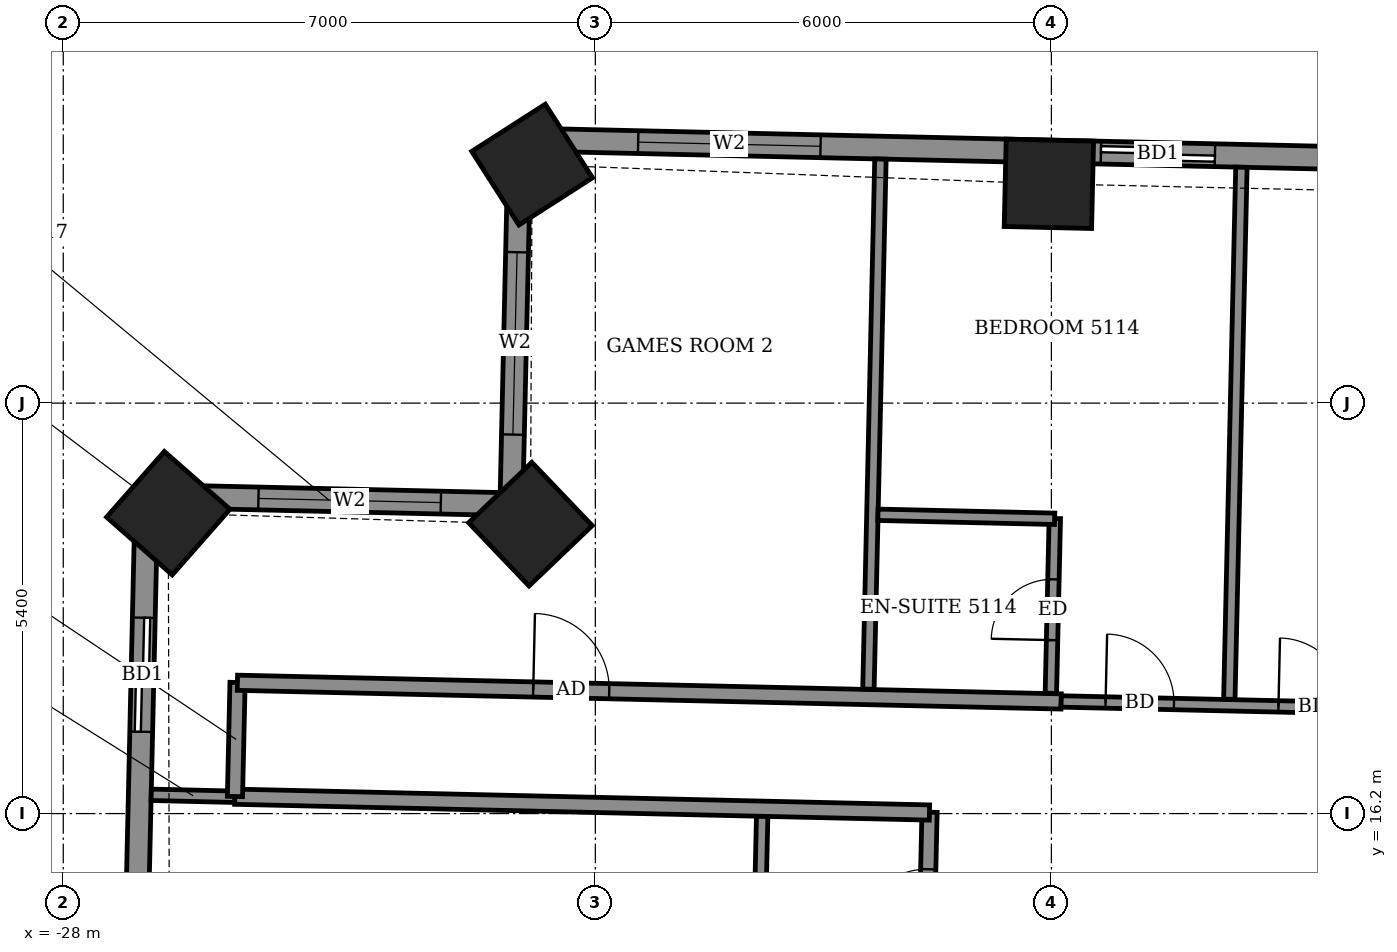
"""IFC4 building model, lengths in metres.
Left out: names, types, materials, properties, quantities, classifications, styles, units other than length and angle.
Written with IfcOpenShell. Run it as: python <this file> out.ifc"""

import sys

from ifc_helpers import new_model, si_unit, direction, frame, frame_2d, origin, origin_2d, place, context, subcontext, project, spatial, rectangle, extrude, element, fill, save


model = new_model("IFC4")
c1 = context("Model", 3, precision=1e-05, world=origin(), true_north=direction((0.0, 1.0)))
c2 = subcontext(c1, "Body", "Model", "MODEL_VIEW")
j1 = project(units=[si_unit("LENGTHUNIT", "METRE"), si_unit("PLANEANGLEUNIT", "RADIAN")], contexts=[c1])
p1 = place(None, origin())
s1 = spatial("IfcSite", under=j1, at=p1, CompositionType="ELEMENT")
p2 = place(p1, origin())
s2 = spatial("IfcBuilding", under=s1, at=p2, CompositionType="ELEMENT")
p3 = place(p2, frame((0.0, 0.0, 201.5)))
s3 = spatial("IfcBuildingStorey", under=s2, at=p3, CompositionType="ELEMENT", Elevation=201.5)
for number, where, z_axis, x_axis in (
    (1, (-15.033, 24.485, -0.55), (0.0, 0.0, 1.0), (-1.0, 0.023, 0.0)),
    (2, (-21.832, 24.738, -0.55), (0.0, 0.0, 1.0), (-0.842, -0.54, 0.0)),
    (3, (-21.854, 20.007, -0.55), (0.0, 0.0, 1.0), (-0.723, -0.691, 0.0)),
    (4, (-26.618, 20.152, -0.55), (0.0, 0.0, 1.0), (-0.661, -0.751, 0.0)),
):
    element("IfcColumn", number, at=place(p3, frame(where, z_axis=z_axis, x_axis=x_axis)), inside=s3, PredefinedType="COLUMN", context=c2, shape_type="SweptSolid", body=[
        extrude(rectangle(XDim=1.15, YDim=1.15, at=origin_2d()), origin(), (0.0, 0.0, 1.0), 3.6),
    ])
p4 = place(p3, frame((20.437, 24.106, 0.0), z_axis=(0.0, 0.0, 1.0), x_axis=(-0.999742506232, 0.022691875925, 0.0)))
e5 = element("IfcWall", 5, at=p4, inside=s3, PredefinedType="SOLIDWALL", context=c2, shape_type="SweptSolid", body=[
    extrude(rectangle(XDim=42.444, YDim=0.3, at=frame_2d((21.222, 0.0))), origin(), (0.0, 0.0, 1.0), 3.05),
])
p5 = place(p4, frame((2.287, 0.0, 0.0)))
e6 = element("IfcOpeningElement", 6, at=p5, cuts=e5, PredefinedType="OPENING", context=c2, shape_type="SweptSolid", body=[
    extrude(rectangle(XDim=1.5, YDim=2.4, at=frame_2d((0.75, 1.2))), frame((0.0, 0.16, 0.0), z_axis=(0.0, -1.0, 0.0), x_axis=(1.0, 0.0, 0.0)), (0.0, 0.0, 1.0), 0.32),
])
p6 = place(p4, frame((7.947, 0.0, 0.0)))
e7 = element("IfcOpeningElement", 7, at=p6, cuts=e5, PredefinedType="OPENING", context=c2, shape_type="SweptSolid", body=[
    extrude(rectangle(XDim=1.5, YDim=2.4, at=frame_2d((0.75, 1.2))), frame((0.0, 0.16, 0.0), z_axis=(0.0, -1.0, 0.0), x_axis=(1.0, 0.0, 0.0)), (0.0, 0.0, 1.0), 0.32),
])
p7 = place(p4, frame((11.184, 0.0, 0.0)))
e8 = element("IfcOpeningElement", 8, at=p7, cuts=e5, PredefinedType="OPENING", context=c2, shape_type="SweptSolid", body=[
    extrude(rectangle(XDim=1.5, YDim=2.4, at=frame_2d((0.75, 1.2))), frame((0.0, 0.16, 0.0), z_axis=(0.0, -1.0, 0.0), x_axis=(1.0, 0.0, 0.0)), (0.0, 0.0, 1.0), 0.32),
])
p8 = place(p4, frame((16.469, 0.0, 0.0)))
e9 = element("IfcOpeningElement", 9, at=p8, cuts=e5, PredefinedType="OPENING", context=c2, shape_type="SweptSolid", body=[
    extrude(rectangle(XDim=1.5, YDim=2.4, at=frame_2d((0.75, 1.2))), frame((0.0, 0.16, 0.0), z_axis=(0.0, -1.0, 0.0), x_axis=(1.0, 0.0, 0.0)), (0.0, 0.0, 1.0), 0.32),
])
p9 = place(p4, frame((22.02, 0.0, 0.0)))
e10 = element("IfcOpeningElement", 10, at=p9, cuts=e5, PredefinedType="OPENING", context=c2, shape_type="SweptSolid", body=[
    extrude(rectangle(XDim=1.5, YDim=2.4, at=frame_2d((0.75, 1.2))), frame((0.0, 0.16, 0.0), z_axis=(0.0, -1.0, 0.0), x_axis=(1.0, 0.0, 0.0)), (0.0, 0.0, 1.0), 0.32),
])
p10 = place(p4, frame((25.257, 0.0, 0.0)))
e11 = element("IfcOpeningElement", 11, at=p10, cuts=e5, PredefinedType="OPENING", context=c2, shape_type="SweptSolid", body=[
    extrude(rectangle(XDim=1.5, YDim=2.4, at=frame_2d((0.75, 1.2))), frame((0.0, 0.16, 0.0), z_axis=(0.0, -1.0, 0.0), x_axis=(1.0, 0.0, 0.0)), (0.0, 0.0, 1.0), 0.32),
])
p11 = place(p4, frame((30.057, 0.0, 0.0)))
e12 = element("IfcOpeningElement", 12, at=p11, cuts=e5, PredefinedType="OPENING", context=c2, shape_type="SweptSolid", body=[
    extrude(rectangle(XDim=1.5, YDim=2.4, at=frame_2d((0.75, 1.2))), frame((0.0, 0.16, 0.0), z_axis=(0.0, -1.0, 0.0), x_axis=(1.0, 0.0, 0.0)), (0.0, 0.0, 1.0), 0.32),
])
p12 = place(p4, frame((33.294, 0.0, 0.0)))
e13 = element("IfcOpeningElement", 13, at=p12, cuts=e5, PredefinedType="OPENING", context=c2, shape_type="SweptSolid", body=[
    extrude(rectangle(XDim=1.5, YDim=2.4, at=frame_2d((0.75, 1.2))), frame((0.0, 0.16, 0.0), z_axis=(0.0, -1.0, 0.0), x_axis=(1.0, 0.0, 0.0)), (0.0, 0.0, 1.0), 0.32),
])
p13 = place(p4, frame((38.484, 0.0, 0.9)))
e14 = element("IfcOpeningElement", 14, at=p13, cuts=e5, PredefinedType="OPENING", context=c2, shape_type="SweptSolid", body=[
    extrude(rectangle(XDim=2.4, YDim=1.5, at=frame_2d((1.2, 0.75))), frame((0.0, 0.16, 0.0), z_axis=(0.0, -1.0, 0.0), x_axis=(1.0, 0.0, 0.0)), (0.0, 0.0, 1.0), 0.32),
])
p14 = place(p3, frame((-21.996, 25.069, 0.0), z_axis=(0.0, 0.0, 1.0), x_axis=(-0.022683280499, -0.999742701292, 0.0)))
e15 = element("IfcWall", 15, at=p14, inside=s3, PredefinedType="SOLIDWALL", context=c2, shape_type="SweptSolid", body=[
    extrude(rectangle(XDim=4.8, YDim=0.3, at=frame_2d((2.4, 0.0))), origin(), (0.0, 0.0, 1.0), 2.55),
])
p15 = place(p14, frame((1.484, 0.0, 0.9)))
e16 = element("IfcOpeningElement", 16, at=p15, cuts=e15, PredefinedType="OPENING", context=c2, shape_type="SweptSolid", body=[
    extrude(rectangle(XDim=2.4, YDim=1.5, at=frame_2d((1.2, 0.75))), frame((0.0, 0.16, 0.0), z_axis=(0.0, -1.0, 0.0), x_axis=(1.0, 0.0, 0.0)), (0.0, 0.0, 1.0), 0.32),
])
p16 = place(p3, frame((-22.105, 20.27, 0.0), z_axis=(0.0, 0.0, 1.0), x_axis=(-0.999742701292, 0.022683280499, 0.0)))
e17 = element("IfcWall", 17, at=p16, inside=s3, PredefinedType="SOLIDWALL", context=c2, shape_type="SweptSolid", body=[
    extrude(rectangle(XDim=4.8, YDim=0.3, at=frame_2d((2.4, 0.0))), origin(), (0.0, 0.0, 1.0), 2.55),
])
p17 = place(p16, frame((0.928, 0.0, 0.9)))
e18 = element("IfcOpeningElement", 18, at=p17, cuts=e17, PredefinedType="OPENING", context=c2, shape_type="SweptSolid", body=[
    extrude(rectangle(XDim=2.4, YDim=1.5, at=frame_2d((1.2, 0.75))), frame((0.0, 0.16, 0.0), z_axis=(0.0, -1.0, 0.0), x_axis=(1.0, 0.0, 0.0)), (0.0, 0.0, 1.0), 0.32),
])
p18 = place(p3, frame((-26.904, 20.379, 0.0), z_axis=(0.0, 0.0, 1.0), x_axis=(-0.022669030322, -0.999743024514, 0.0)))
e19 = element("IfcWall", 19, at=p18, inside=s3, PredefinedType="SOLIDWALL", context=c2, shape_type="SweptSolid", body=[
    extrude(rectangle(XDim=11.33, YDim=0.3, at=frame_2d((5.665, 0.0))), origin(), (0.0, 0.0, 1.0), 2.55),
])
p19 = place(p18, frame((1.603, 0.0, 0.0)))
e20 = element("IfcOpeningElement", 20, at=p19, cuts=e19, PredefinedType="OPENING", context=c2, shape_type="SweptSolid", body=[
    extrude(rectangle(XDim=1.5, YDim=2.4, at=frame_2d((0.75, 1.2))), frame((0.0, 0.16, 0.0), z_axis=(0.0, -1.0, 0.0), x_axis=(1.0, 0.0, 0.0)), (0.0, 0.0, 1.0), 0.32),
])
p20 = place(p18, frame((7.218, 0.0, 0.9)))
e21 = element("IfcOpeningElement", 21, at=p20, cuts=e19, PredefinedType="OPENING", context=c2, shape_type="SweptSolid", body=[
    extrude(rectangle(XDim=2.4, YDim=1.5, at=frame_2d((1.2, 0.75))), frame((0.0, 0.16, 0.0), z_axis=(0.0, -1.0, 0.0), x_axis=(1.0, 0.0, 0.0)), (0.0, 0.0, 1.0), 0.32),
])
p21 = place(p3, frame((-17.247, -12.149, 0.0), z_axis=(0.0, 0.0, 1.0), x_axis=(0.022698146637, 0.999742363881, 0.0)))
e22 = element("IfcWall", 22, at=p21, inside=s3, PredefinedType="PARTITIONING", context=c2, shape_type="SweptSolid", body=[
    extrude(rectangle(XDim=28.374, YDim=0.2, at=frame_2d((14.187, 0.0))), origin(), (0.0, 0.0, 1.0), 3.05),
])
p22 = place(p21, frame((23.0, 0.0, 0.0)))
e23 = element("IfcOpeningElement", 23, at=p22, cuts=e22, PredefinedType="OPENING", context=c2, shape_type="SweptSolid", body=[
    extrude(rectangle(XDim=1.0, YDim=2.1, at=frame_2d((0.5, 1.05))), frame((0.0, 0.11, 0.0), z_axis=(0.0, -1.0, 0.0), x_axis=(1.0, 0.0, 0.0)), (0.0, 0.0, 1.0), 0.22),
])
p23 = place(p21, frame((26.724, 0.0, 0.0)))
e24 = element("IfcOpeningElement", 24, at=p23, cuts=e22, PredefinedType="OPENING", context=c2, shape_type="SweptSolid", body=[
    extrude(rectangle(XDim=0.9, YDim=2.1, at=frame_2d((0.45, 1.05))), frame((0.0, 0.11, 0.0), z_axis=(0.0, -1.0, 0.0), x_axis=(1.0, 0.0, 0.0)), (0.0, 0.0, 1.0), 0.22),
])
p24 = place(p21, frame((17.025, 0.0, 0.0)))
e25 = element("IfcOpeningElement", 25, at=p24, cuts=e22, PredefinedType="OPENING", context=c2, shape_type="SweptSolid", body=[
    extrude(rectangle(XDim=1.0, YDim=2.1, at=frame_2d((0.5, 1.05))), frame((0.0, 0.11, 0.0), z_axis=(0.0, -1.0, 0.0), x_axis=(1.0, 0.0, 0.0)), (0.0, 0.0, 1.0), 0.22),
])
p25 = place(p21, frame((19.275, 0.0, 0.0)))
e26 = element("IfcOpeningElement", 26, at=p25, cuts=e22, PredefinedType="OPENING", context=c2, shape_type="SweptSolid", body=[
    extrude(rectangle(XDim=0.9, YDim=2.1, at=frame_2d((0.45, 1.05))), frame((0.0, 0.11, 0.0), z_axis=(0.0, -1.0, 0.0), x_axis=(1.0, 0.0, 0.0)), (0.0, 0.0, 1.0), 0.22),
])
p26 = place(p21, frame((14.95, 0.0, 0.0)))
e27 = element("IfcOpeningElement", 27, at=p26, cuts=e22, PredefinedType="OPENING", context=c2, shape_type="SweptSolid", body=[
    extrude(rectangle(XDim=1.0, YDim=2.1, at=frame_2d((0.5, 1.05))), frame((0.0, 0.11, 0.0), z_axis=(0.0, -1.0, 0.0), x_axis=(1.0, 0.0, 0.0)), (0.0, 0.0, 1.0), 0.22),
])
p27 = place(p21, frame((12.625, 0.0, 0.0)))
e28 = element("IfcOpeningElement", 28, at=p27, cuts=e22, PredefinedType="OPENING", context=c2, shape_type="SweptSolid", body=[
    extrude(rectangle(XDim=0.9, YDim=2.1, at=frame_2d((0.45, 1.05))), frame((0.0, 0.11, 0.0), z_axis=(0.0, -1.0, 0.0), x_axis=(1.0, 0.0, 0.0)), (0.0, 0.0, 1.0), 0.22),
])
p28 = place(p21, frame((10.275, 0.0, 0.0)))
e29 = element("IfcOpeningElement", 29, at=p28, cuts=e22, PredefinedType="OPENING", context=c2, shape_type="SweptSolid", body=[
    extrude(rectangle(XDim=1.0, YDim=2.1, at=frame_2d((0.5, 1.05))), frame((0.0, 0.11, 0.0), z_axis=(0.0, -1.0, 0.0), x_axis=(1.0, 0.0, 0.0)), (0.0, 0.0, 1.0), 0.22),
])
p29 = place(p21, frame((8.025, 0.0, 0.0)))
e30 = element("IfcOpeningElement", 30, at=p29, cuts=e22, PredefinedType="OPENING", context=c2, shape_type="SweptSolid", body=[
    extrude(rectangle(XDim=0.9, YDim=2.1, at=frame_2d((0.45, 1.05))), frame((0.0, 0.11, 0.0), z_axis=(0.0, -1.0, 0.0), x_axis=(1.0, 0.0, 0.0)), (0.0, 0.0, 1.0), 0.22),
])
p30 = place(p21, frame((4.337, 0.0, 0.0)))
e31 = element("IfcOpeningElement", 31, at=p30, cuts=e22, PredefinedType="OPENING", context=c2, shape_type="SweptSolid", body=[
    extrude(rectangle(XDim=1.0, YDim=2.1, at=frame_2d((0.5, 1.05))), frame((0.0, 0.11, 0.0), z_axis=(0.0, -1.0, 0.0), x_axis=(1.0, 0.0, 0.0)), (0.0, 0.0, 1.0), 0.22),
])
p31 = place(p21, frame((0.75, 0.0, 0.0)))
e32 = element("IfcOpeningElement", 32, at=p31, cuts=e22, PredefinedType="OPENING", context=c2, shape_type="SweptSolid", body=[
    extrude(rectangle(XDim=0.9, YDim=2.1, at=frame_2d((0.45, 1.05))), frame((0.0, 0.11, 0.0), z_axis=(0.0, -1.0, 0.0), x_axis=(1.0, 0.0, 0.0)), (0.0, 0.0, 1.0), 0.22),
])
p32 = place(p3, frame((-18.857, 13.869, 0.0), z_axis=(0.0, 0.0, 1.0), x_axis=(0.022612884682, 0.999744296031, 0.0)))
e33 = element("IfcWall", 33, at=p32, inside=s3, PredefinedType="PARTITIONING", context=c2, shape_type="SweptSolid", body=[
    extrude(rectangle(XDim=2.3, YDim=0.15, at=frame_2d((1.15, 0.0))), origin(), (0.0, 0.0, 1.0), 3.05),
])
p33 = place(p3, frame((-26.843, 16.447, 0.0), z_axis=(0.0, 0.0, 1.0), x_axis=(0.999720170098, -0.023655475055, 0.0)))
e34 = element("IfcWall", 34, at=p33, inside=s3, PredefinedType="PARTITIONING", context=c2, shape_type="SweptSolid", body=[
    extrude(rectangle(XDim=1.104, YDim=0.15, at=frame_2d((0.552, 0.0))), origin(), (0.0, 0.0, 1.0), 2.55),
])
p34 = place(p3, frame((-25.743, 16.422, 0.0), z_axis=(0.0, 0.0, 1.0), x_axis=(0.999741076645, -0.022754772455, 0.0)))
e35 = element("IfcWall", 35, at=p34, inside=s3, PredefinedType="PARTITIONING", context=c2, shape_type="SweptSolid", body=[
    extrude(rectangle(XDim=9.141, YDim=0.2, at=frame_2d((4.571, 0.0))), origin(), (0.0, 0.0, 1.0), 3.05),
])
p35 = place(p3, frame((-25.741, 16.425, 0.0), z_axis=(0.0, 0.0, 1.0), x_axis=(0.022617910375, 0.999744182344, 0.0)))
e36 = element("IfcWall", 36, at=p35, inside=s3, PredefinedType="PARTITIONING", context=c2, shape_type="SweptSolid", body=[
    extrude(rectangle(XDim=1.5, YDim=0.2, at=frame_2d((0.75, 0.0))), origin(), (0.0, 0.0, 1.0), 3.05),
])
p36 = place(p3, frame((-25.709, 17.921, 0.0), z_axis=(0.0, 0.0, 1.0), x_axis=(0.999742764922, -0.022680475901, 0.0)))
e37 = element("IfcWall", 37, at=p36, inside=s3, PredefinedType="PARTITIONING", context=c2, shape_type="SweptSolid", body=[
    extrude(rectangle(XDim=10.84, YDim=0.2, at=frame_2d((5.42, 0.0))), origin(), (0.0, 0.0, 1.0), 3.05),
])
p37 = place(p36, frame((3.893, 0.0, 0.0)))
e38 = element("IfcOpeningElement", 38, at=p37, cuts=e37, PredefinedType="OPENING", context=c2, shape_type="SweptSolid", body=[
    extrude(rectangle(XDim=1.0, YDim=2.1, at=frame_2d((0.5, 1.05))), frame((0.0, 0.11, 0.0), z_axis=(0.0, -1.0, 0.0), x_axis=(1.0, 0.0, 0.0)), (0.0, 0.0, 1.0), 0.22),
])
p38 = place(p3, frame((-14.871, 17.675, 0.0), z_axis=(0.0, 0.0, 1.0), x_axis=(0.999742359486, -0.02269834024, 0.0)))
e39 = element("IfcWall", 39, at=p38, inside=s3, PredefinedType="PARTITIONING", context=c2, shape_type="SweptSolid", body=[
    extrude(rectangle(XDim=30.536, YDim=0.15, at=frame_2d((15.268, 0.0))), origin(), (0.0, 0.0, 1.0), 3.05),
])
p39 = place(p38, frame((28.159, 0.0, 0.0)))
e40 = element("IfcOpeningElement", 40, at=p39, cuts=e39, PredefinedType="OPENING", context=c2, shape_type="SweptSolid", body=[
    extrude(rectangle(XDim=0.9, YDim=2.1, at=frame_2d((0.45, 1.05))), frame((0.0, 0.085, 0.0), z_axis=(0.0, -1.0, 0.0), x_axis=(1.0, 0.0, 0.0)), (0.0, 0.0, 1.0), 0.17),
])
p40 = place(p38, frame((21.034, 0.0, 0.0)))
e41 = element("IfcOpeningElement", 41, at=p40, cuts=e39, PredefinedType="OPENING", context=c2, shape_type="SweptSolid", body=[
    extrude(rectangle(XDim=0.9, YDim=2.1, at=frame_2d((0.45, 1.05))), frame((0.0, 0.085, 0.0), z_axis=(0.0, -1.0, 0.0), x_axis=(1.0, 0.0, 0.0)), (0.0, 0.0, 1.0), 0.17),
])
p41 = place(p38, frame((18.684, 0.0, 0.0)))
e42 = element("IfcOpeningElement", 42, at=p41, cuts=e39, PredefinedType="OPENING", context=c2, shape_type="SweptSolid", body=[
    extrude(rectangle(XDim=0.9, YDim=2.1, at=frame_2d((0.45, 1.05))), frame((0.0, 0.085, 0.0), z_axis=(0.0, -1.0, 0.0), x_axis=(1.0, 0.0, 0.0)), (0.0, 0.0, 1.0), 0.17),
])
p42 = place(p38, frame((11.709, 0.0, 0.0)))
e43 = element("IfcOpeningElement", 43, at=p42, cuts=e39, PredefinedType="OPENING", context=c2, shape_type="SweptSolid", body=[
    extrude(rectangle(XDim=0.9, YDim=2.1, at=frame_2d((0.45, 1.05))), frame((0.0, 0.085, 0.0), z_axis=(0.0, -1.0, 0.0), x_axis=(1.0, 0.0, 0.0)), (0.0, 0.0, 1.0), 0.17),
])
p43 = place(p38, frame((9.734, 0.0, 0.0)))
e44 = element("IfcOpeningElement", 44, at=p43, cuts=e39, PredefinedType="OPENING", context=c2, shape_type="SweptSolid", body=[
    extrude(rectangle(XDim=0.9, YDim=2.1, at=frame_2d((0.45, 1.05))), frame((0.0, 0.085, 0.0), z_axis=(0.0, -1.0, 0.0), x_axis=(1.0, 0.0, 0.0)), (0.0, 0.0, 1.0), 0.17),
])
p44 = place(p38, frame((2.859, 0.0, 0.0)))
e45 = element("IfcOpeningElement", 45, at=p44, cuts=e39, PredefinedType="OPENING", context=c2, shape_type="SweptSolid", body=[
    extrude(rectangle(XDim=0.9, YDim=2.1, at=frame_2d((0.45, 1.05))), frame((0.0, 0.085, 0.0), z_axis=(0.0, -1.0, 0.0), x_axis=(1.0, 0.0, 0.0)), (0.0, 0.0, 1.0), 0.17),
])
p45 = place(p38, frame((0.584, 0.0, 0.0)))
e46 = element("IfcOpeningElement", 46, at=p45, cuts=e39, PredefinedType="OPENING", context=c2, shape_type="SweptSolid", body=[
    extrude(rectangle(XDim=0.9, YDim=2.1, at=frame_2d((0.45, 1.05))), frame((0.0, 0.085, 0.0), z_axis=(0.0, -1.0, 0.0), x_axis=(1.0, 0.0, 0.0)), (0.0, 0.0, 1.0), 0.17),
])
p46 = place(p3, frame((-17.407, 17.837, 0.0), z_axis=(0.0, 0.0, 1.0), x_axis=(0.022643496158, 0.999743603171, 0.0)))
e47 = element("IfcWall", 47, at=p46, inside=s3, PredefinedType="PARTITIONING", context=c2, shape_type="SweptSolid", body=[
    extrude(rectangle(XDim=6.976, YDim=0.15, at=frame_2d((3.488, 0.0))), origin(), (0.0, 0.0, 1.0), 2.55),
])
p47 = place(p3, frame((-15.007, 17.782, 0.0), z_axis=(0.0, 0.0, 1.0), x_axis=(0.022603288534, 0.999744513037, 0.0)))
e48 = element("IfcWall", 48, at=p47, inside=s3, PredefinedType="PARTITIONING", context=c2, shape_type="SweptSolid", body=[
    extrude(rectangle(XDim=2.301, YDim=0.15, at=frame_2d((1.15, 0.0))), origin(), (0.0, 0.0, 1.0), 3.05),
])
p48 = place(p47, frame((0.7, 0.0, 0.0)))
e49 = element("IfcOpeningElement", 49, at=p48, cuts=e48, PredefinedType="OPENING", context=c2, shape_type="SweptSolid", body=[
    extrude(rectangle(XDim=0.8, YDim=2.1, at=frame_2d((0.4, 1.05))), frame((0.0, 0.085, 0.0), z_axis=(0.0, -1.0, 0.0), x_axis=(1.0, 0.0, 0.0)), (0.0, 0.0, 1.0), 0.17),
])
p49 = place(p3, frame((-12.659, 17.704, 0.0), z_axis=(0.0, 0.0, 1.0), x_axis=(0.022703185001, 0.999742249478, 0.0)))
e50 = element("IfcWall", 50, at=p49, inside=s3, PredefinedType="PARTITIONING", context=c2, shape_type="SweptSolid", body=[
    extrude(rectangle(XDim=7.0, YDim=0.15, at=frame_2d((3.5, 0.0))), origin(), (0.0, 0.0, 1.0), 2.55),
])
p50 = place(p3, frame((-17.282, 20.131, 0.0), z_axis=(0.0, 0.0, 1.0), x_axis=(0.999738082346, -0.022885950011, 0.0)))
e51 = element("IfcWall", 51, at=p50, inside=s3, PredefinedType="PARTITIONING", context=c2, shape_type="SweptSolid", body=[
    extrude(rectangle(XDim=2.325, YDim=0.15, at=frame_2d((1.163, 0.0))), origin(), (0.0, 0.0, 1.0), 3.05),
])
p51 = place(p12, origin())
e52 = element("IfcDoor", 52, at=p51, inside=s3, OperationType="SLIDING_TO_LEFT", PredefinedType="DOOR", context=c2, shape_type="SweptSolid", body=[
    extrude(rectangle(XDim=1.5, YDim=2.4, at=frame_2d((0.75, 1.2))), frame((0.0, 0.025, 0.0), z_axis=(0.0, -1.0, 0.0), x_axis=(1.0, 0.0, 0.0)), (0.0, 0.0, 1.0), 0.05),
])
fill(e13, e52)
p52 = place(p13, origin())
e53 = element("IfcWindow", 53, at=p52, inside=s3, PartitioningType="DOUBLE_PANEL_VERTICAL", PredefinedType="WINDOW", context=c2, shape_type="SweptSolid", body=[
    extrude(rectangle(XDim=2.4, YDim=1.5, at=frame_2d((1.2, 0.75))), frame((0.0, 0.03, 0.0), z_axis=(0.0, -1.0, 0.0), x_axis=(1.0, 0.0, 0.0)), (0.0, 0.0, 1.0), 0.06),
])
fill(e14, e53)
p53 = place(p15, origin())
e54 = element("IfcWindow", 54, at=p53, inside=s3, PartitioningType="DOUBLE_PANEL_VERTICAL", PredefinedType="WINDOW", context=c2, shape_type="SweptSolid", body=[
    extrude(rectangle(XDim=2.4, YDim=1.5, at=frame_2d((1.2, 0.75))), frame((0.0, 0.03, 0.0), z_axis=(0.0, -1.0, 0.0), x_axis=(1.0, 0.0, 0.0)), (0.0, 0.0, 1.0), 0.06),
])
fill(e16, e54)
p54 = place(p17, origin())
e55 = element("IfcWindow", 55, at=p54, inside=s3, PartitioningType="DOUBLE_PANEL_VERTICAL", PredefinedType="WINDOW", context=c2, shape_type="SweptSolid", body=[
    extrude(rectangle(XDim=2.4, YDim=1.5, at=frame_2d((1.2, 0.75))), frame((0.0, 0.03, 0.0), z_axis=(0.0, -1.0, 0.0), x_axis=(1.0, 0.0, 0.0)), (0.0, 0.0, 1.0), 0.06),
])
fill(e18, e55)
p55 = place(p19, origin())
e56 = element("IfcDoor", 56, at=p55, inside=s3, OperationType="SLIDING_TO_LEFT", PredefinedType="DOOR", context=c2, shape_type="SweptSolid", body=[
    extrude(rectangle(XDim=1.5, YDim=2.4, at=frame_2d((0.75, 1.2))), frame((0.0, 0.025, 0.0), z_axis=(0.0, -1.0, 0.0), x_axis=(1.0, 0.0, 0.0)), (0.0, 0.0, 1.0), 0.05),
])
fill(e20, e56)
p56 = place(p44, origin())
e57 = element("IfcDoor", 57, at=p56, inside=s3, OperationType="SINGLE_SWING_LEFT", PredefinedType="DOOR", context=c2, shape_type="SweptSolid", body=[
    extrude(rectangle(XDim=0.9, YDim=2.1, at=frame_2d((0.45, 1.05))), frame((0.0, 0.025, 0.0), z_axis=(0.0, -1.0, 0.0), x_axis=(1.0, 0.0, 0.0)), (0.0, 0.0, 1.0), 0.05),
])
fill(e45, e57)
p57 = place(p45, origin())
e58 = element("IfcDoor", 58, at=p57, inside=s3, OperationType="SINGLE_SWING_RIGHT", PredefinedType="DOOR", context=c2, shape_type="SweptSolid", body=[
    extrude(rectangle(XDim=0.9, YDim=2.1, at=frame_2d((0.45, 1.05))), frame((0.0, 0.025, 0.0), z_axis=(0.0, -1.0, 0.0), x_axis=(1.0, 0.0, 0.0)), (0.0, 0.0, 1.0), 0.05),
])
fill(e46, e58)
p58 = place(p48, origin())
e59 = element("IfcDoor", 59, at=p58, inside=s3, OperationType="SINGLE_SWING_RIGHT", PredefinedType="DOOR", context=c2, shape_type="SweptSolid", body=[
    extrude(rectangle(XDim=0.8, YDim=2.1, at=frame_2d((0.4, 1.05))), frame((0.0, 0.025, 0.0), z_axis=(0.0, -1.0, 0.0), x_axis=(1.0, 0.0, 0.0)), (0.0, 0.0, 1.0), 0.05),
])
fill(e49, e59)
p59 = place(p37, origin())
e60 = element("IfcDoor", 60, at=p59, inside=s3, OperationType="SINGLE_SWING_RIGHT", PredefinedType="DOOR", context=c2, shape_type="SweptSolid", body=[
    extrude(rectangle(XDim=1.0, YDim=2.1, at=frame_2d((0.5, 1.05))), frame((0.0, 0.025, 0.0), z_axis=(0.0, -1.0, 0.0), x_axis=(1.0, 0.0, 0.0)), (0.0, 0.0, 1.0), 0.05),
])
fill(e38, e60)
p60 = place(p23, origin())
e61 = element("IfcDoor", 61, at=p60, inside=s3, OperationType="SINGLE_SWING_RIGHT", PredefinedType="DOOR", context=c2, shape_type="SweptSolid", body=[
    extrude(rectangle(XDim=0.9, YDim=2.1, at=frame_2d((0.45, 1.05))), frame((0.0, 0.025, 0.0), z_axis=(0.0, -1.0, 0.0), x_axis=(1.0, 0.0, 0.0)), (0.0, 0.0, 1.0), 0.05),
])
fill(e24, e61)
save(model, sys.argv[1])
